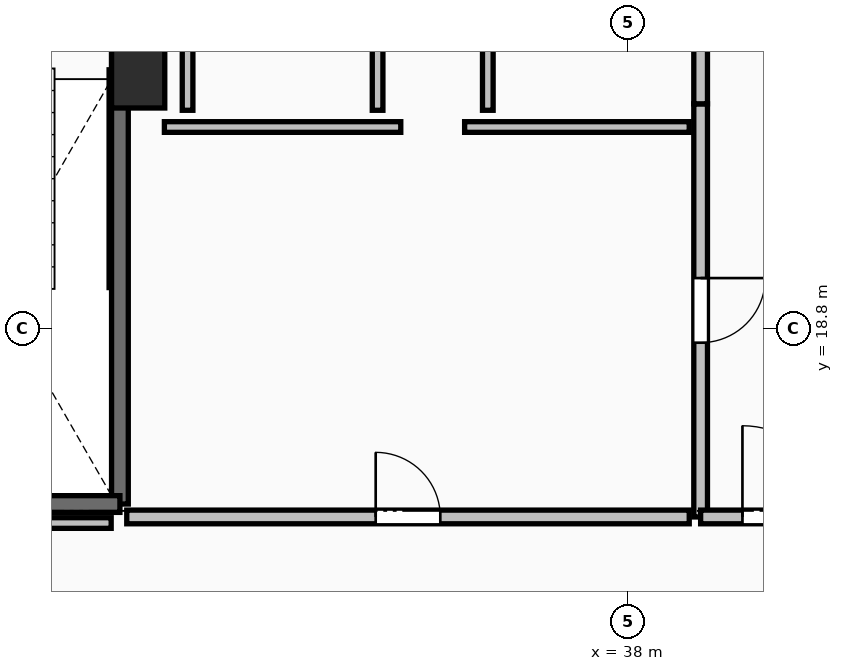
"""IFC4 building model, lengths in metres.
Left out: names, types, materials, properties, quantities, classifications, styles, units other than length and angle.
Written with IfcOpenShell. Run it as: python <this file> out.ifc"""

import sys

from ifc_helpers import new_model, si_unit, direction, frame, frame_2d, origin, origin_2d, place, context, subcontext, project, spatial, rectangle, extrude, element, fill, save


model = new_model("IFC4")
c1 = context("Model", 3, precision=1e-05, world=origin(), true_north=direction((0.0, 1.0)))
c2 = subcontext(c1, "Body", "Model", "MODEL_VIEW")
j1 = project(units=[si_unit("LENGTHUNIT", "METRE"), si_unit("PLANEANGLEUNIT", "RADIAN")], contexts=[c1])
p1 = place(None, origin())
s1 = spatial("IfcSite", under=j1, at=p1, CompositionType="ELEMENT")
p2 = place(p1, origin())
s2 = spatial("IfcBuilding", under=s1, at=p2, CompositionType="ELEMENT")
p3 = place(p2, frame((0.0, 0.0, 237.8)))
s3 = spatial("IfcBuildingStorey", under=s2, at=p3, CompositionType="ELEMENT", Elevation=237.8)
p4 = place(p3, frame((31.55, 22.2, 0.0), z_axis=(0.0, 0.0, 1.0), x_axis=(1.0, 0.0, 0.0)))
e1 = element("IfcColumn", 1, at=p4, inside=s3, PredefinedType="PILASTER", context=c2, shape_type="SweptSolid", body=[
    extrude(rectangle(XDim=0.7, YDim=1.0, at=origin_2d()), origin(), (0.0, 0.0, 1.0), 3.55),
])
p5 = place(p3, frame((31.31, 23.91, 0.0), z_axis=(0.0, 0.0, 1.0), x_axis=(0.0, -1.0, 0.0)))
e2 = element("IfcWall", 2, at=p5, inside=s3, PredefinedType="SOLIDWALL", context=c2, shape_type="SweptSolid", body=[
    extrude(rectangle(XDim=7.42, YDim=0.22, at=frame_2d((3.71, 0.0))), origin(), (0.0, 0.0, 1.0), 3.29),
])
p6 = place(p3, frame((31.31, 16.49, 0.0), z_axis=(0.0, 0.0, 1.0), x_axis=(-1.0, 0.0, 0.0)))
e3 = element("IfcWall", 3, at=p6, inside=s3, PredefinedType="SOLIDWALL", context=c2, shape_type="SweptSolid", body=[
    extrude(rectangle(XDim=3.37, YDim=0.22, at=frame_2d((1.685, 0.0))), origin(), (0.0, 0.0, 1.0), 3.29),
])
p7 = place(p3, frame((38.95, 21.755, 0.0), z_axis=(0.0, 0.0, 1.0), x_axis=(0.0, -1.0, 0.0)))
e4 = element("IfcWall", 4, at=p7, inside=s3, PredefinedType="PARTITIONING", context=c2, shape_type="SweptSolid", body=[
    extrude(rectangle(XDim=5.435, YDim=0.18, at=frame_2d((2.717, 0.0))), origin(), (0.0, 0.0, 1.0), 3.29),
])
p8 = place(p7, frame((2.292, 0.0, 0.0)))
e5 = element("IfcOpeningElement", 5, at=p8, cuts=e4, PredefinedType="OPENING", context=c2, shape_type="SweptSolid", body=[
    extrude(rectangle(XDim=0.85, YDim=2.1, at=frame_2d((0.425, 1.05))), frame((0.0, 0.105, 0.0), z_axis=(0.0, -1.0, 0.0), x_axis=(1.0, 0.0, 0.0)), (0.0, 0.0, 1.0), 0.21),
])
p9 = place(p3, frame((38.95, 24.2, 0.0), z_axis=(0.0, 0.0, 1.0), x_axis=(0.0, -1.0, 0.0)))
e6 = element("IfcWall", 6, at=p9, inside=s3, PredefinedType="PARTITIONING", context=c2, shape_type="SweptSolid", body=[
    extrude(rectangle(XDim=2.445, YDim=0.18, at=frame_2d((1.223, 0.0))), origin(), (0.0, 0.0, 1.0), 2.482),
])
p10 = place(p9, frame((0.722, 0.0, 0.0)))
e7 = element("IfcOpeningElement", 7, at=p10, cuts=e6, PredefinedType="OPENING", context=c2, shape_type="SweptSolid", body=[
    extrude(rectangle(XDim=1.0, YDim=2.15, at=frame_2d((0.5, 1.075))), frame((0.0, 0.105, 0.0), z_axis=(0.0, -1.0, 0.0), x_axis=(1.0, 0.0, 0.0)), (0.0, 0.0, 1.0), 0.21),
])
p11 = place(p3, frame((38.95, 16.32, 0.0), z_axis=(0.0, 0.0, 1.0), x_axis=(1.0, 0.0, 0.0)))
e8 = element("IfcWall", 8, at=p11, inside=s3, PredefinedType="PARTITIONING", context=c2, shape_type="SweptSolid", body=[
    extrude(rectangle(XDim=2.3, YDim=0.18, at=frame_2d((1.15, 0.0))), origin(), (0.0, 0.0, 1.0), 3.29),
])
p12 = place(p11, frame((0.55, 0.0, 0.0)))
e9 = element("IfcOpeningElement", 9, at=p12, cuts=e8, PredefinedType="OPENING", context=c2, shape_type="SweptSolid", body=[
    extrude(rectangle(XDim=1.2, YDim=2.15, at=frame_2d((0.6, 1.075))), frame((0.0, 0.105, 0.0), z_axis=(0.0, -1.0, 0.0), x_axis=(1.0, 0.0, 0.0)), (0.0, 0.0, 1.0), 0.21),
])
p13 = place(p3, frame((35.005, 21.45, 0.0), z_axis=(0.0, 0.0, 1.0), x_axis=(-1.0, 0.0, 0.0)))
e10 = element("IfcWall", 10, at=p13, inside=s3, PredefinedType="PARTITIONING", context=c2, shape_type="SweptSolid", body=[
    extrude(rectangle(XDim=3.11, YDim=0.14, at=frame_2d((1.555, 0.0))), origin(), (0.0, 0.0, 1.0), 3.29),
])
p14 = place(p3, frame((38.8, 21.45, 0.0), z_axis=(0.0, 0.0, 1.0), x_axis=(-1.0, 0.0, 0.0)))
e11 = element("IfcWall", 11, at=p14, inside=s3, PredefinedType="PARTITIONING", context=c2, shape_type="SweptSolid", body=[
    extrude(rectangle(XDim=2.955, YDim=0.14, at=frame_2d((1.478, 0.0))), origin(), (0.0, 0.0, 1.0), 3.29),
])
p15 = place(p3, frame((31.4, 16.32, 0.0), z_axis=(0.0, 0.0, 1.0), x_axis=(1.0, 0.0, 0.0)))
e12 = element("IfcWall", 12, at=p15, inside=s3, PredefinedType="PARTITIONING", context=c2, shape_type="SweptSolid", body=[
    extrude(rectangle(XDim=7.4, YDim=0.18, at=frame_2d((3.7, 0.0))), origin(), (0.0, 0.0, 1.0), 3.29),
])
p16 = place(p15, frame((3.275, 0.0, 0.0)))
e13 = element("IfcOpeningElement", 13, at=p16, cuts=e12, PredefinedType="OPENING", context=c2, shape_type="SweptSolid", body=[
    extrude(rectangle(XDim=0.85, YDim=2.1, at=frame_2d((0.425, 1.05))), frame((0.0, 0.105, 0.0), z_axis=(0.0, -1.0, 0.0), x_axis=(1.0, 0.0, 0.0)), (0.0, 0.0, 1.0), 0.21),
])
for number, where, z_axis, x_axis in (
    (14, (32.2, 24.13, 0.0), (0.0, 0.0, 1.0), (0.0, -1.0, 0.0)),
    (15, (34.7, 21.67, 0.0), (0.0, 0.0, 1.0), (0.0, 1.0, 0.0)),
    (16, (36.15, 24.13, 0.0), (0.0, 0.0, 1.0), (0.0, -1.0, 0.0)),
):
    element("IfcWall", number, at=place(p3, frame(where, z_axis=z_axis, x_axis=x_axis)), inside=s3, PredefinedType="PARTITIONING", context=c2, shape_type="SweptSolid", body=[
        extrude(rectangle(XDim=2.46, YDim=0.14, at=frame_2d((1.23, 0.0))), origin(), (0.0, 0.0, 1.0), 2.482),
    ])
p17 = place(p3, frame((27.45, 16.24, 0.0), z_axis=(0.0, 0.0, 1.0), x_axis=(1.0, 0.0, 0.0)))
e17 = element("IfcWall", 17, at=p17, inside=s3, PredefinedType="PARTITIONING", context=c2, shape_type="SweptSolid", body=[
    extrude(rectangle(XDim=3.745, YDim=0.14, at=frame_2d((1.873, 0.0))), origin(), (0.0, 0.0, 1.0), 2.482),
])
p18 = place(p8, origin())
e18 = element("IfcDoor", 18, at=p18, inside=s3, OperationType="SINGLE_SWING_LEFT", PredefinedType="DOOR", context=c2, shape_type="SweptSolid", body=[
    extrude(rectangle(XDim=0.85, YDim=2.1, at=frame_2d((0.425, 1.05))), frame((0.0, 0.025, 0.0), z_axis=(0.0, -1.0, 0.0), x_axis=(1.0, 0.0, 0.0)), (0.0, 0.0, 1.0), 0.05),
])
fill(e5, e18)
p19 = place(p12, origin())
e19 = element("IfcDoor", 19, at=p19, inside=s3, OperationType="SINGLE_SWING_LEFT", PredefinedType="DOOR", context=c2, shape_type="SweptSolid", body=[
    extrude(rectangle(XDim=1.2, YDim=2.15, at=frame_2d((0.6, 1.075))), frame((0.0, 0.025, 0.0), z_axis=(0.0, -1.0, 0.0), x_axis=(1.0, 0.0, 0.0)), (0.0, 0.0, 1.0), 0.05),
])
fill(e9, e19)
p20 = place(p16, origin())
e20 = element("IfcDoor", 20, at=p20, inside=s3, OperationType="SINGLE_SWING_LEFT", PredefinedType="DOOR", context=c2, shape_type="SweptSolid", body=[
    extrude(rectangle(XDim=0.85, YDim=2.1, at=frame_2d((0.425, 1.05))), frame((0.0, 0.025, 0.0), z_axis=(0.0, -1.0, 0.0), x_axis=(1.0, 0.0, 0.0)), (0.0, 0.0, 1.0), 0.05),
])
fill(e13, e20)
save(model, sys.argv[1])
